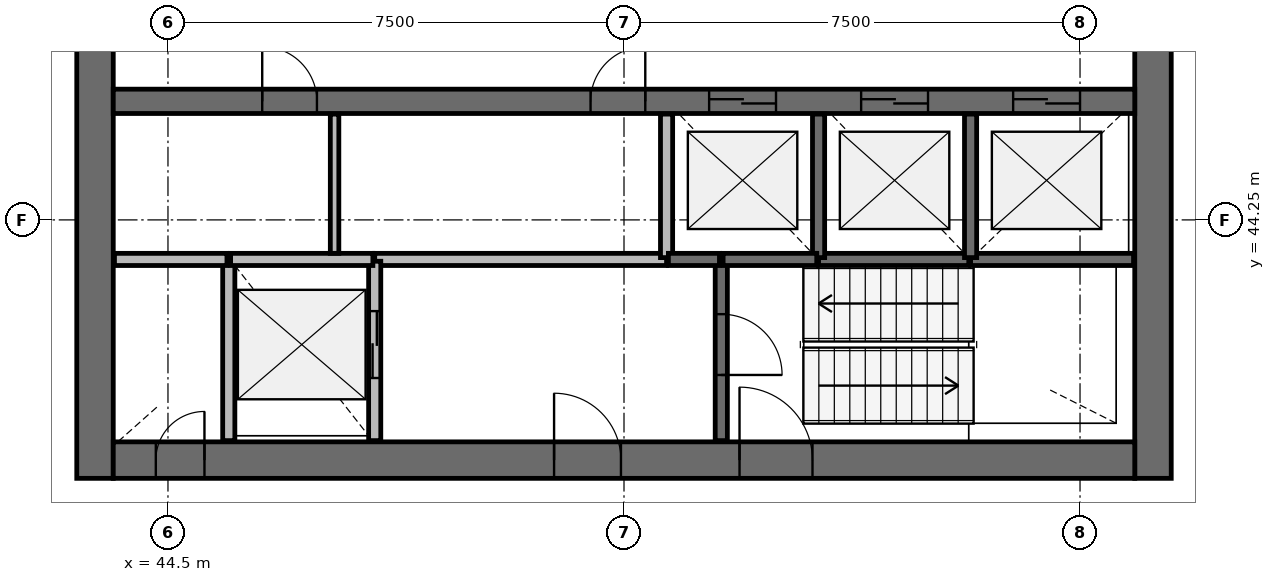
"""IFC4 building model, lengths in metres.
Left out: names, types, materials, properties, quantities, classifications, styles, units other than length and angle.
Written with IfcOpenShell. Run it as: python <this file> out.ifc"""

import sys

from ifc_helpers import new_model, si_unit, direction, frame, frame_2d, origin, place, context, subcontext, project, spatial, rectangle, extrude, source, transform, mapped, element, fill, save


model = new_model("IFC4")
c1 = context("Model", 3, precision=1e-05, world=origin(), true_north=direction((0.0, 1.0)))
c2 = subcontext(c1, "Body", "Model", "MODEL_VIEW")
j1 = project(units=[si_unit("LENGTHUNIT", "METRE"), si_unit("PLANEANGLEUNIT", "RADIAN")], contexts=[c1])
p1 = place(None, origin())
s1 = spatial("IfcSite", under=j1, at=p1, CompositionType="ELEMENT")
p2 = place(p1, origin())
s2 = spatial("IfcBuilding", under=s1, at=p2, CompositionType="ELEMENT")
p3 = place(p2, frame((0.0, 0.0, 203.3)))
s3 = spatial("IfcBuildingStorey", under=s2, at=p3, CompositionType="ELEMENT", Elevation=203.3)
p4 = place(p3, frame((60.7, 40.0, 0.0), z_axis=(0.0, 0.0, 1.0), x_axis=(0.0, 1.0, 0.0)))
e1 = element("IfcWall", 1, at=p4, inside=s3, PredefinedType="SHEAR", context=c2, shape_type="SweptSolid", body=[
    extrude(rectangle(XDim=16.0, YDim=0.6, at=frame_2d((8.0, 0.0))), origin(), (0.0, 0.0, 1.0), 3.9),
])
p5 = place(p4, frame((7.1, 0.0, 0.0)))
e2 = element("IfcOpeningElement", 2, at=p5, cuts=e1, PredefinedType="OPENING", context=c2, shape_type="SweptSolid", body=[
    extrude(rectangle(XDim=1.8, YDim=2.1, at=frame_2d((0.9, 1.05))), frame((0.0, 0.31, 0.0), z_axis=(0.0, -1.0, 0.0), x_axis=(1.0, 0.0, 0.0)), (0.0, 0.0, 1.0), 0.62),
])
p6 = place(p3, frame((43.3, 56.0, 0.0), z_axis=(0.0, 0.0, 1.0), x_axis=(0.0, -1.0, 0.0)))
e3 = element("IfcWall", 3, at=p6, inside=s3, PredefinedType="SHEAR", context=c2, shape_type="SweptSolid", body=[
    extrude(rectangle(XDim=16.0, YDim=0.6, at=frame_2d((8.0, 0.0))), origin(), (0.0, 0.0, 1.0), 3.9),
])
p7 = place(p6, frame((7.1, 0.0, 0.0)))
e4 = element("IfcOpeningElement", 4, at=p7, cuts=e3, PredefinedType="OPENING", context=c2, shape_type="SweptSolid", body=[
    extrude(rectangle(XDim=1.8, YDim=2.1, at=frame_2d((0.9, 1.05))), frame((0.0, 0.31, 0.0), z_axis=(0.0, -1.0, 0.0), x_axis=(1.0, 0.0, 0.0)), (0.0, 0.0, 1.0), 0.62),
])
p8 = place(p3, frame((43.6, 40.3, 0.0), z_axis=(0.0, 0.0, 1.0), x_axis=(1.0, 0.0, 0.0)))
e5 = element("IfcWall", 5, at=p8, inside=s3, PredefinedType="SHEAR", context=c2, shape_type="SweptSolid", body=[
    extrude(rectangle(XDim=16.8, YDim=0.6, at=frame_2d((8.4, 0.0))), origin(), (0.0, 0.0, 1.0), 3.9),
])
p9 = place(p8, frame((10.3, 0.0, 0.0)))
e6 = element("IfcOpeningElement", 6, at=p9, cuts=e5, PredefinedType="OPENING", context=c2, shape_type="SweptSolid", body=[
    extrude(rectangle(XDim=1.2, YDim=2.1, at=frame_2d((0.6, 1.05))), frame((0.0, 0.31, 0.0), z_axis=(0.0, -1.0, 0.0), x_axis=(1.0, 0.0, 0.0)), (0.0, 0.0, 1.0), 0.62),
])
p10 = place(p8, frame((7.25, 0.0, 0.0)))
e7 = element("IfcOpeningElement", 7, at=p10, cuts=e5, PredefinedType="OPENING", context=c2, shape_type="SweptSolid", body=[
    extrude(rectangle(XDim=1.1, YDim=2.1, at=frame_2d((0.55, 1.05))), frame((0.0, 0.31, 0.0), z_axis=(0.0, -1.0, 0.0), x_axis=(1.0, 0.0, 0.0)), (0.0, 0.0, 1.0), 0.62),
])
p11 = place(p8, frame((0.7, 0.0, 0.0)))
e8 = element("IfcOpeningElement", 8, at=p11, cuts=e5, PredefinedType="OPENING", context=c2, shape_type="SweptSolid", body=[
    extrude(rectangle(XDim=0.8, YDim=2.1, at=frame_2d((0.4, 1.05))), frame((0.0, 0.31, 0.0), z_axis=(0.0, -1.0, 0.0), x_axis=(1.0, 0.0, 0.0)), (0.0, 0.0, 1.0), 0.62),
])
p12 = place(p3, frame((43.6, 46.2, 0.0), z_axis=(0.0, 0.0, 1.0), x_axis=(1.0, 0.0, 0.0)))
e9 = element("IfcWall", 9, at=p12, inside=s3, PredefinedType="SHEAR", context=c2, shape_type="SweptSolid", body=[
    extrude(rectangle(XDim=16.8, YDim=0.4, at=frame_2d((8.4, 0.0))), origin(), (0.0, 0.0, 1.0), 3.9),
])
p13 = place(p12, frame((9.8, 0.0, 0.0)))
e10 = element("IfcOpeningElement", 10, at=p13, cuts=e9, PredefinedType="OPENING", context=c2, shape_type="SweptSolid", body=[
    extrude(rectangle(XDim=1.1, YDim=2.1, at=frame_2d((0.55, 1.05))), frame((0.0, 0.21, 0.0), z_axis=(0.0, -1.0, 0.0), x_axis=(1.0, 0.0, 0.0)), (0.0, 0.0, 1.0), 0.42),
])
p14 = place(p12, frame((12.3, 0.0, 0.0)))
e11 = element("IfcOpeningElement", 11, at=p14, cuts=e9, PredefinedType="OPENING", context=c2, shape_type="SweptSolid", body=[
    extrude(rectangle(XDim=1.1, YDim=2.1, at=frame_2d((0.55, 1.05))), frame((0.0, 0.21, 0.0), z_axis=(0.0, -1.0, 0.0), x_axis=(1.0, 0.0, 0.0)), (0.0, 0.0, 1.0), 0.42),
])
p15 = place(p12, frame((14.8, 0.0, 0.0)))
e12 = element("IfcOpeningElement", 12, at=p15, cuts=e9, PredefinedType="OPENING", context=c2, shape_type="SweptSolid", body=[
    extrude(rectangle(XDim=1.1, YDim=2.1, at=frame_2d((0.55, 1.05))), frame((0.0, 0.21, 0.0), z_axis=(0.0, -1.0, 0.0), x_axis=(1.0, 0.0, 0.0)), (0.0, 0.0, 1.0), 0.42),
])
p16 = place(p12, frame((2.45, 0.0, 0.0)))
e13 = element("IfcOpeningElement", 13, at=p16, cuts=e9, PredefinedType="OPENING", context=c2, shape_type="SweptSolid", body=[
    extrude(rectangle(XDim=0.9, YDim=2.1, at=frame_2d((0.45, 1.05))), frame((0.0, 0.21, 0.0), z_axis=(0.0, -1.0, 0.0), x_axis=(1.0, 0.0, 0.0)), (0.0, 0.0, 1.0), 0.42),
])
p17 = place(p12, frame((7.85, 0.0, 0.0)))
e14 = element("IfcOpeningElement", 14, at=p17, cuts=e9, PredefinedType="OPENING", context=c2, shape_type="SweptSolid", body=[
    extrude(rectangle(XDim=0.9, YDim=2.1, at=frame_2d((0.45, 1.05))), frame((0.0, 0.21, 0.0), z_axis=(0.0, -1.0, 0.0), x_axis=(1.0, 0.0, 0.0)), (0.0, 0.0, 1.0), 0.42),
])
p18 = place(p3, frame((52.7, 43.6, 0.0), z_axis=(0.0, 0.0, 1.0), x_axis=(-1.0, 0.0, 0.0)))
e15 = element("IfcWall", 15, at=p18, inside=s3, PredefinedType="SOLIDWALL", context=c2, shape_type="SweptSolid", body=[
    extrude(rectangle(XDim=4.8, YDim=0.2, at=frame_2d((2.4, 0.0))), origin(), (0.0, 0.0, 1.0), 3.58),
])
p19 = place(p3, frame((45.5, 43.6, 0.0), z_axis=(0.0, 0.0, 1.0), x_axis=(0.0, -1.0, 0.0)))
e16 = element("IfcWall", 16, at=p19, inside=s3, PredefinedType="SOLIDWALL", context=c2, shape_type="SweptSolid", body=[
    extrude(rectangle(XDim=2.98, YDim=0.2, at=frame_2d((1.49, 0.0))), origin(), (0.0, 0.0, 1.0), 3.58),
])
p20 = place(p3, frame((47.9, 40.62, 0.0), z_axis=(0.0, 0.0, 1.0), x_axis=(0.0, 1.0, 0.0)))
e17 = element("IfcWall", 17, at=p20, inside=s3, PredefinedType="SOLIDWALL", context=c2, shape_type="SweptSolid", body=[
    extrude(rectangle(XDim=2.95, YDim=0.2, at=frame_2d((1.475, 0.0))), origin(), (0.0, 0.0, 1.0), 3.58),
])
p21 = place(p20, frame((1.03, 0.0, 0.0)))
e18 = element("IfcOpeningElement", 18, at=p21, cuts=e17, PredefinedType="OPENING", context=c2, shape_type="SweptSolid", body=[
    extrude(rectangle(XDim=1.1, YDim=2.1, at=frame_2d((0.55, 1.05))), frame((0.0, 0.11, 0.0), z_axis=(0.0, -1.0, 0.0), x_axis=(1.0, 0.0, 0.0)), (0.0, 0.0, 1.0), 0.22),
])
p22 = place(p3, frame((53.6, 43.6, 0.0), z_axis=(0.0, 0.0, 1.0), x_axis=(0.0, -1.0, 0.0)))
e19 = element("IfcWall", 19, at=p22, inside=s3, PredefinedType="SOLIDWALL", context=c2, shape_type="SweptSolid", body=[
    extrude(rectangle(XDim=2.98, YDim=0.2, at=frame_2d((1.49, 0.0))), origin(), (0.0, 0.0, 1.0), 3.58),
])
p23 = place(p22, frame((0.9, 0.0, 0.0)))
e20 = element("IfcOpeningElement", 20, at=p23, cuts=e19, PredefinedType="OPENING", context=c2, shape_type="SweptSolid", body=[
    extrude(rectangle(XDim=1.0, YDim=2.1, at=frame_2d((0.5, 1.05))), frame((0.0, 0.11, 0.0), z_axis=(0.0, -1.0, 0.0), x_axis=(1.0, 0.0, 0.0)), (0.0, 0.0, 1.0), 0.22),
])
p24 = place(p3, frame((57.7, 43.6, 0.0), z_axis=(0.0, 0.0, 1.0), x_axis=(1.0, 0.0, 0.0)))
e21 = element("IfcWall", 21, at=p24, inside=s3, PredefinedType="SOLIDWALL", context=c2, shape_type="SweptSolid", body=[
    extrude(rectangle(XDim=2.68, YDim=0.2, at=frame_2d((1.34, 0.0))), origin(), (0.0, 0.0, 1.0), 3.58),
])
p25 = place(p3, frame((55.2, 43.6, 0.0), z_axis=(0.0, 0.0, 1.0), x_axis=(1.0, 0.0, 0.0)))
e22 = element("IfcWall", 22, at=p25, inside=s3, PredefinedType="SOLIDWALL", context=c2, shape_type="SweptSolid", body=[
    extrude(rectangle(XDim=2.47, YDim=0.2, at=frame_2d((1.235, 0.0))), origin(), (0.0, 0.0, 1.0), 3.58),
])
p26 = place(p3, frame((47.87, 43.6, 0.0), z_axis=(0.0, 0.0, 1.0), x_axis=(-1.0, 0.0, 0.0)))
e23 = element("IfcWall", 23, at=p26, inside=s3, PredefinedType="SOLIDWALL", context=c2, shape_type="SweptSolid", body=[
    extrude(rectangle(XDim=2.34, YDim=0.2, at=frame_2d((1.17, 0.0))), origin(), (0.0, 0.0, 1.0), 3.58),
])
for number, where, z_axis, x_axis in (
    (24, (52.7, 45.99, 0.0), (0.0, 0.0, 1.0), (0.0, -1.0, 0.0)),
    (25, (55.2, 43.63, 0.0), (0.0, 0.0, 1.0), (0.0, 1.0, 0.0)),
    (26, (57.7, 43.63, 0.0), (0.0, 0.0, 1.0), (0.0, 1.0, 0.0)),
):
    element("IfcWall", number, at=place(p3, frame(where, z_axis=z_axis, x_axis=x_axis)), inside=s3, PredefinedType="SOLIDWALL", context=c2, shape_type="SweptSolid", body=[
        extrude(rectangle(XDim=2.36, YDim=0.2, at=frame_2d((1.18, 0.0))), origin(), (0.0, 0.0, 1.0), 3.58),
    ])
p27 = place(p3, frame((45.47, 43.6, 0.0), z_axis=(0.0, 0.0, 1.0), x_axis=(-1.0, 0.0, 0.0)))
e27 = element("IfcWall", 27, at=p27, inside=s3, PredefinedType="SOLIDWALL", context=c2, shape_type="SweptSolid", body=[
    extrude(rectangle(XDim=1.85, YDim=0.2, at=frame_2d((0.925, 0.0))), origin(), (0.0, 0.0, 1.0), 3.58),
])
p28 = place(p3, frame((53.63, 43.6, 0.0), z_axis=(0.0, 0.0, 1.0), x_axis=(1.0, 0.0, 0.0)))
e28 = element("IfcWall", 28, at=p28, inside=s3, PredefinedType="SOLIDWALL", context=c2, shape_type="SweptSolid", body=[
    extrude(rectangle(XDim=1.54, YDim=0.2, at=frame_2d((0.77, 0.0))), origin(), (0.0, 0.0, 1.0), 3.58),
])
p29 = place(p3, frame((52.73, 43.6, 0.0), z_axis=(0.0, 0.0, 1.0), x_axis=(1.0, 0.0, 0.0)))
e29 = element("IfcWall", 29, at=p29, inside=s3, PredefinedType="SOLIDWALL", context=c2, shape_type="SweptSolid", body=[
    extrude(rectangle(XDim=0.84, YDim=0.2, at=frame_2d((0.42, 0.0))), origin(), (0.0, 0.0, 1.0), 3.58),
])
p30 = place(p3, frame((47.24, 43.7, 0.0), z_axis=(0.0, 0.0, 1.0), x_axis=(0.0, 1.0, 0.0)))
e30 = element("IfcWall", 30, at=p30, inside=s3, PredefinedType="PARTITIONING", context=c2, shape_type="SweptSolid", body=[
    extrude(rectangle(XDim=2.29, YDim=0.14, at=frame_2d((1.145, 0.0))), origin(), (0.0, 0.0, 1.0), 2.88),
])
m1 = source(origin(), c2, "Body", "SweptSolid", [
    extrude(rectangle(XDim=1.1, YDim=2.1, at=frame_2d((0.55, 1.05))), frame((0.0, 0.025, 0.0), z_axis=(0.0, -1.0, 0.0), x_axis=(1.0, 0.0, 0.0)), (0.0, 0.0, 1.0), 0.05),
])
p31 = place(p13, origin())
e31 = element("IfcDoor", 31, at=p31, inside=s3, OperationType="DOUBLE_DOOR_SLIDING", PredefinedType="USERDEFINED", context=c2, shape_type="MappedRepresentation", body=[
    mapped(m1, transform((0.0, 0.0, 0.0), scale=1.0)),
])
fill(e10, e31)
p32 = place(p14, origin())
e32 = element("IfcDoor", 32, at=p32, inside=s3, OperationType="DOUBLE_DOOR_SLIDING", PredefinedType="USERDEFINED", context=c2, shape_type="MappedRepresentation", body=[
    mapped(m1, transform((0.0, 0.0, 0.0), scale=1.0)),
])
fill(e11, e32)
p33 = place(p15, origin())
e33 = element("IfcDoor", 33, at=p33, inside=s3, OperationType="DOUBLE_DOOR_SLIDING", PredefinedType="USERDEFINED", context=c2, shape_type="MappedRepresentation", body=[
    mapped(m1, transform((0.0, 0.0, 0.0), scale=1.0)),
])
fill(e12, e33)
p34 = place(p21, origin())
e34 = element("IfcDoor", 34, at=p34, inside=s3, OperationType="DOUBLE_DOOR_SLIDING", PredefinedType="USERDEFINED", context=c2, shape_type="MappedRepresentation", body=[
    mapped(m1, transform((0.0, 0.0, 0.0), scale=1.0)),
])
fill(e18, e34)
m2 = source(origin(), c2, "Body", "SweptSolid", [
    extrude(rectangle(XDim=1.2, YDim=2.1, at=frame_2d((0.6, 1.05))), frame((0.0, 0.025, 0.0), z_axis=(0.0, -1.0, 0.0), x_axis=(1.0, 0.0, 0.0)), (0.0, 0.0, 1.0), 0.05),
])
p35 = place(p9, origin())
e35 = element("IfcDoor", 35, at=p35, inside=s3, OperationType="SINGLE_SWING_LEFT", PredefinedType="DOOR", context=c2, shape_type="MappedRepresentation", body=[
    mapped(m2, transform((0.0, 0.0, 0.0), scale=1.0)),
])
fill(e6, e35)
m3 = source(origin(), c2, "Body", "SweptSolid", [
    extrude(rectangle(XDim=1.0, YDim=2.1, at=frame_2d((0.5, 1.05))), frame((0.0, 0.025, 0.0), z_axis=(0.0, -1.0, 0.0), x_axis=(1.0, 0.0, 0.0)), (0.0, 0.0, 1.0), 0.05),
])
p36 = place(p23, origin())
e36 = element("IfcDoor", 36, at=p36, inside=s3, OperationType="SINGLE_SWING_RIGHT", PredefinedType="DOOR", context=c2, shape_type="MappedRepresentation", body=[
    mapped(m3, transform((0.0, 0.0, 0.0), scale=1.0)),
])
fill(e20, e36)
m4 = source(origin(), c2, "Body", "SweptSolid", [
    extrude(rectangle(XDim=1.1, YDim=2.1, at=frame_2d((0.55, 1.05))), frame((0.0, 0.025, 0.0), z_axis=(0.0, -1.0, 0.0), x_axis=(1.0, 0.0, 0.0)), (0.0, 0.0, 1.0), 0.05),
])
p37 = place(p10, origin())
e37 = element("IfcDoor", 37, at=p37, inside=s3, OperationType="SINGLE_SWING_LEFT", PredefinedType="DOOR", context=c2, shape_type="MappedRepresentation", body=[
    mapped(m4, transform((0.0, 0.0, 0.0), scale=1.0)),
])
fill(e7, e37)
m5 = source(origin(), c2, "Body", "SweptSolid", [
    extrude(rectangle(XDim=0.8, YDim=2.1, at=frame_2d((0.4, 1.05))), frame((0.0, 0.025, 0.0), z_axis=(0.0, -1.0, 0.0), x_axis=(1.0, 0.0, 0.0)), (0.0, 0.0, 1.0), 0.05),
])
p38 = place(p11, origin())
e38 = element("IfcDoor", 38, at=p38, inside=s3, OperationType="SINGLE_SWING_RIGHT", PredefinedType="DOOR", context=c2, shape_type="MappedRepresentation", body=[
    mapped(m5, transform((0.0, 0.0, 0.0), scale=1.0)),
])
fill(e8, e38)
m6 = source(origin(), c2, "Body", "SweptSolid", [
    extrude(rectangle(XDim=0.9, YDim=2.1, at=frame_2d((0.45, 1.05))), frame((0.0, 0.025, 0.0), z_axis=(0.0, -1.0, 0.0), x_axis=(1.0, 0.0, 0.0)), (0.0, 0.0, 1.0), 0.05),
])
p39 = place(p16, origin())
e39 = element("IfcDoor", 39, at=p39, inside=s3, OperationType="SINGLE_SWING_LEFT", PredefinedType="DOOR", context=c2, shape_type="MappedRepresentation", body=[
    mapped(m6, transform((0.0, 0.0, 0.0), scale=1.0)),
])
fill(e13, e39)
p40 = place(p17, origin())
e40 = element("IfcDoor", 40, at=p40, inside=s3, OperationType="SINGLE_SWING_RIGHT", PredefinedType="DOOR", context=c2, shape_type="MappedRepresentation", body=[
    mapped(m6, transform((0.0, 0.0, 0.0), scale=1.0)),
])
fill(e14, e40)
save(model, sys.argv[1])
